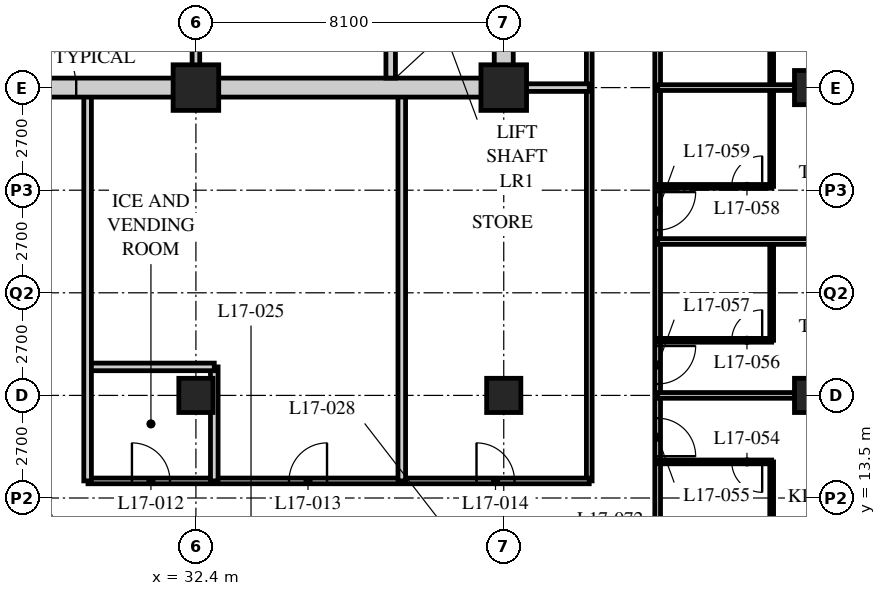
"""IFC4 building model, lengths in metres.
Left out: names, types, materials, properties, quantities, classifications, styles, units other than length and angle.
Written with IfcOpenShell. Run it as: python <this file> out.ifc"""

import sys

from ifc_helpers import new_model, si_unit, direction, frame, frame_2d, origin, origin_2d, place, context, subcontext, project, spatial, rectangle, hollow_rectangle, extrude, element, fill, save


model = new_model("IFC4")
c1 = context("Model", 3, precision=1e-05, world=origin(), true_north=direction((0.0, 1.0)))
c2 = subcontext(c1, "Body", "Model", "MODEL_VIEW")
j1 = project(units=[si_unit("LENGTHUNIT", "METRE"), si_unit("PLANEANGLEUNIT", "RADIAN")], contexts=[c1])
p1 = place(None, origin())
s1 = spatial("IfcSite", under=j1, at=p1, CompositionType="ELEMENT")
p2 = place(p1, origin())
s2 = spatial("IfcBuilding", under=s1, at=p2, CompositionType="ELEMENT")
p3 = place(p2, frame((0.0, 0.0, 70.4)))
s3 = spatial("IfcBuildingStorey", under=s2, at=p3, CompositionType="ELEMENT", Elevation=70.4)
p4 = place(p3, frame((32.4, 16.2, 0.0), z_axis=(0.0, 0.0, 1.0), x_axis=(1.0, 0.0, 0.0)))
e1 = element("IfcColumn", 1, at=p4, inside=s3, PredefinedType="COLUMN", context=c2, shape_type="SweptSolid", body=[
    extrude(hollow_rectangle(XDim=0.9, YDim=0.9, WallThickness=0.09, at=origin_2d()), origin(), (0.0, 0.0, 1.0), 3.4),
])
p5 = place(p3, frame((32.4, 24.3, 0.0), z_axis=(0.0, 0.0, 1.0), x_axis=(1.0, 0.0, 0.0)))
e2 = element("IfcColumn", 2, at=p5, inside=s3, PredefinedType="COLUMN", context=c2, shape_type="SweptSolid", body=[
    extrude(hollow_rectangle(XDim=1.2, YDim=1.2, WallThickness=0.12, at=origin_2d()), origin(), (0.0, 0.0, 1.0), 3.4),
])
p6 = place(p3, frame((40.5, 16.2, 0.0), z_axis=(0.0, 0.0, 1.0), x_axis=(1.0, 0.0, 0.0)))
e3 = element("IfcColumn", 3, at=p6, inside=s3, PredefinedType="COLUMN", context=c2, shape_type="SweptSolid", body=[
    extrude(hollow_rectangle(XDim=0.9, YDim=0.9, WallThickness=0.09, at=origin_2d()), origin(), (0.0, 0.0, 1.0), 3.4),
])
p7 = place(p3, frame((40.5, 24.3, 0.0), z_axis=(0.0, 0.0, 1.0), x_axis=(1.0, 0.0, 0.0)))
e4 = element("IfcColumn", 4, at=p7, inside=s3, PredefinedType="COLUMN", context=c2, shape_type="SweptSolid", body=[
    extrude(hollow_rectangle(XDim=1.2, YDim=1.2, WallThickness=0.12, at=origin_2d()), origin(), (0.0, 0.0, 1.0), 3.4),
])
for number, where, z_axis, x_axis in (
    (5, (48.6, 16.2, 0.0), (0.0, 0.0, 1.0), (1.0, 0.0, 0.0)),
    (6, (48.6, 24.3, 0.0), (0.0, 0.0, 1.0), (1.0, 0.0, 0.0)),
):
    element("IfcColumn", number, at=place(p3, frame(where, z_axis=z_axis, x_axis=x_axis)), inside=s3, PredefinedType="COLUMN", context=c2, shape_type="SweptSolid", body=[
        extrude(hollow_rectangle(XDim=0.9, YDim=0.9, WallThickness=0.09, at=origin_2d()), origin(), (0.0, 0.0, 1.0), 3.4),
    ])
p8 = place(p3, frame((44.55, 12.15, 0.0), z_axis=(0.0, 0.0, 1.0), x_axis=(0.0, 1.0, 0.0)))
e7 = element("IfcWall", 7, at=p8, inside=s3, PredefinedType="PARTITIONING", context=c2, shape_type="SweptSolid", body=[
    extrude(rectangle(XDim=30.15, YDim=0.15, at=frame_2d((15.075, 0.0))), origin(), (0.0, 0.0, 1.0), 3.19),
])
p9 = place(p8, frame((2.45, 0.0, 0.0)))
e8 = element("IfcOpeningElement", 8, at=p9, cuts=e7, PredefinedType="OPENING", context=c2, shape_type="SweptSolid", body=[
    extrude(rectangle(XDim=1.0, YDim=2.1, at=frame_2d((0.5, 1.05))), frame((0.0, 0.085, 0.0), z_axis=(0.0, -1.0, 0.0), x_axis=(1.0, 0.0, 0.0)), (0.0, 0.0, 1.0), 0.17),
])
p10 = place(p8, frame((4.35, 0.0, 0.0)))
e9 = element("IfcOpeningElement", 9, at=p10, cuts=e7, PredefinedType="OPENING", context=c2, shape_type="SweptSolid", body=[
    extrude(rectangle(XDim=1.0, YDim=2.1, at=frame_2d((0.5, 1.05))), frame((0.0, 0.085, 0.0), z_axis=(0.0, -1.0, 0.0), x_axis=(1.0, 0.0, 0.0)), (0.0, 0.0, 1.0), 0.17),
])
p11 = place(p8, frame((8.4, 0.0, 0.0)))
e10 = element("IfcOpeningElement", 10, at=p11, cuts=e7, PredefinedType="OPENING", context=c2, shape_type="SweptSolid", body=[
    extrude(rectangle(XDim=1.0, YDim=2.1, at=frame_2d((0.5, 1.05))), frame((0.0, 0.085, 0.0), z_axis=(0.0, -1.0, 0.0), x_axis=(1.0, 0.0, 0.0)), (0.0, 0.0, 1.0), 0.17),
])
p12 = place(p8, frame((14.6, 0.0, 0.0)))
e11 = element("IfcOpeningElement", 11, at=p12, cuts=e7, PredefinedType="OPENING", context=c2, shape_type="SweptSolid", body=[
    extrude(rectangle(XDim=1.0, YDim=2.1, at=frame_2d((0.5, 1.05))), frame((0.0, 0.085, 0.0), z_axis=(0.0, -1.0, 0.0), x_axis=(1.0, 0.0, 0.0)), (0.0, 0.0, 1.0), 0.17),
])
p13 = place(p8, frame((21.65, 0.0, 0.0)))
e12 = element("IfcOpeningElement", 12, at=p13, cuts=e7, PredefinedType="OPENING", context=c2, shape_type="SweptSolid", body=[
    extrude(rectangle(XDim=1.0, YDim=2.1, at=frame_2d((0.5, 1.05))), frame((0.0, 0.085, 0.0), z_axis=(0.0, -1.0, 0.0), x_axis=(1.0, 0.0, 0.0)), (0.0, 0.0, 1.0), 0.17),
])
p14 = place(p8, frame((26.7, 0.0, 0.0)))
e13 = element("IfcOpeningElement", 13, at=p14, cuts=e7, PredefinedType="OPENING", context=c2, shape_type="SweptSolid", body=[
    extrude(rectangle(XDim=1.0, YDim=2.1, at=frame_2d((0.5, 1.05))), frame((0.0, 0.085, 0.0), z_axis=(0.0, -1.0, 0.0), x_axis=(1.0, 0.0, 0.0)), (0.0, 0.0, 1.0), 0.17),
])
p15 = place(p3, frame((42.75, 13.95, 0.0), z_axis=(0.0, 0.0, 1.0), x_axis=(0.0, 1.0, 0.0)))
e14 = element("IfcWall", 14, at=p15, inside=s3, PredefinedType="PARTITIONING", context=c2, shape_type="SweptSolid", body=[
    extrude(rectangle(XDim=26.55, YDim=0.15, at=frame_2d((13.275, 0.0))), origin(), (0.0, 0.0, 1.0), 3.19),
])
p16 = place(p15, frame((13.9, 0.0, 0.0)))
e15 = element("IfcOpeningElement", 15, at=p16, cuts=e14, PredefinedType="OPENING", context=c2, shape_type="SweptSolid", body=[
    extrude(rectangle(XDim=1.0, YDim=2.1, at=frame_2d((0.5, 1.05))), frame((0.0, 0.085, 0.0), z_axis=(0.0, -1.0, 0.0), x_axis=(1.0, 0.0, 0.0)), (0.0, 0.0, 1.0), 0.17),
])
p17 = place(p15, frame((22.0, 0.0, 0.0)))
e16 = element("IfcOpeningElement", 16, at=p17, cuts=e14, PredefinedType="OPENING", context=c2, shape_type="SweptSolid", body=[
    extrude(rectangle(XDim=1.0, YDim=2.1, at=frame_2d((0.5, 1.05))), frame((0.0, 0.085, 0.0), z_axis=(0.0, -1.0, 0.0), x_axis=(1.0, 0.0, 0.0)), (0.0, 0.0, 1.0), 0.17),
])
p18 = place(p3, frame((29.56, 13.95, 0.0), z_axis=(0.0, 0.0, 1.0), x_axis=(1.0, 0.0, 0.0)))
e17 = element("IfcWall", 17, at=p18, inside=s3, PredefinedType="PARTITIONING", context=c2, shape_type="SweptSolid", body=[
    extrude(rectangle(XDim=13.19, YDim=0.15, at=frame_2d((6.595, 0.0))), origin(), (0.0, 0.0, 1.0), 3.19),
])
p19 = place(p18, frame((1.157, 0.0, 0.0)))
e18 = element("IfcOpeningElement", 18, at=p19, cuts=e17, PredefinedType="OPENING", context=c2, shape_type="SweptSolid", body=[
    extrude(rectangle(XDim=1.0, YDim=2.1, at=frame_2d((0.5, 1.05))), frame((0.0, 0.085, 0.0), z_axis=(0.0, -1.0, 0.0), x_axis=(1.0, 0.0, 0.0)), (0.0, 0.0, 1.0), 0.17),
])
p20 = place(p18, frame((5.29, 0.0, 0.0)))
e19 = element("IfcOpeningElement", 19, at=p20, cuts=e17, PredefinedType="OPENING", context=c2, shape_type="SweptSolid", body=[
    extrude(rectangle(XDim=1.0, YDim=2.1, at=frame_2d((0.5, 1.05))), frame((0.0, 0.085, 0.0), z_axis=(0.0, -1.0, 0.0), x_axis=(1.0, 0.0, 0.0)), (0.0, 0.0, 1.0), 0.17),
])
p21 = place(p18, frame((10.223, 0.0, 0.0)))
e20 = element("IfcOpeningElement", 20, at=p21, cuts=e17, PredefinedType="OPENING", context=c2, shape_type="SweptSolid", body=[
    extrude(rectangle(XDim=1.0, YDim=2.1, at=frame_2d((0.5, 1.05))), frame((0.0, 0.085, 0.0), z_axis=(0.0, -1.0, 0.0), x_axis=(1.0, 0.0, 0.0)), (0.0, 0.0, 1.0), 0.17),
])
p22 = place(p3, frame((32.883, 13.95, 0.0), z_axis=(0.0, 0.0, 1.0), x_axis=(0.0, 1.0, 0.0)))
e21 = element("IfcWall", 21, at=p22, inside=s3, PredefinedType="SOLIDWALL", context=c2, shape_type="SweptSolid", body=[
    extrude(rectangle(XDim=3.0, YDim=0.2, at=frame_2d((1.5, 0.0))), origin(), (0.0, 0.0, 1.0), 3.19),
])
p23 = place(p3, frame((29.55, 16.95, 0.0), z_axis=(0.0, 0.0, 1.0), x_axis=(1.0, 0.0, 0.0)))
e22 = element("IfcWall", 22, at=p23, inside=s3, PredefinedType="SOLIDWALL", context=c2, shape_type="SweptSolid", body=[
    extrude(rectangle(XDim=3.333, YDim=0.2, at=frame_2d((1.667, 0.0))), origin(), (0.0, 0.0, 1.0), 3.19),
])
for number, where, z_axis, x_axis in (
    (23, (37.817, 13.95, 0.0), (0.0, 0.0, 1.0), (0.0, 1.0, 0.0)),
    (24, (29.55, 13.95, 0.0), (0.0, 0.0, 1.0), (0.0, 1.0, 0.0)),
):
    element("IfcWall", number, at=place(p3, frame(where, z_axis=z_axis, x_axis=x_axis)), inside=s3, PredefinedType="SOLIDWALL", context=c2, shape_type="SweptSolid", body=[
        extrude(rectangle(XDim=10.35, YDim=0.2, at=frame_2d((5.175, 0.0))), origin(), (0.0, 0.0, 1.0), 3.19),
    ])
p24 = place(p3, frame((40.5, 24.3, 0.0), z_axis=(0.0, 0.0, 1.0), x_axis=(1.0, 0.0, 0.0)))
e25 = element("IfcWall", 25, at=p24, inside=s3, PredefinedType="SOLIDWALL", context=c2, shape_type="SweptSolid", body=[
    extrude(rectangle(XDim=2.25, YDim=0.2, at=frame_2d((1.125, 0.0))), origin(), (0.0, 0.0, 1.0), 2.578),
])
p25 = place(p3, frame((47.55, 12.15, 0.0), z_axis=(0.0, 0.0, 1.0), x_axis=(0.0, 1.0, 0.0)))
e26 = element("IfcWall", 26, at=p25, inside=s3, PredefinedType="PARTITIONING", context=c2, shape_type="SweptSolid", body=[
    extrude(rectangle(XDim=2.3, YDim=0.1, at=frame_2d((1.15, 0.0))), origin(), (0.0, 0.0, 1.0), 3.19),
])
p26 = place(p3, frame((44.55, 14.45, 0.0), z_axis=(0.0, 0.0, 1.0), x_axis=(1.0, 0.0, 0.0)))
e27 = element("IfcWall", 27, at=p26, inside=s3, PredefinedType="PARTITIONING", context=c2, shape_type="SweptSolid", body=[
    extrude(rectangle(XDim=3.0, YDim=0.1, at=frame_2d((1.5, 0.0))), origin(), (0.0, 0.0, 1.0), 3.19),
])
p27 = place(p26, frame((1.95, 0.0, 0.0)))
e28 = element("IfcOpeningElement", 28, at=p27, cuts=e27, PredefinedType="OPENING", context=c2, shape_type="SweptSolid", body=[
    extrude(rectangle(XDim=0.8, YDim=2.1, at=frame_2d((0.4, 1.05))), frame((0.0, 0.06, 0.0), z_axis=(0.0, -1.0, 0.0), x_axis=(1.0, 0.0, 0.0)), (0.0, 0.0, 1.0), 0.12),
])
p28 = place(p3, frame((44.55, 16.2, 0.0), z_axis=(0.0, 0.0, 1.0), x_axis=(1.0, 0.0, 0.0)))
e29 = element("IfcWall", 29, at=p28, inside=s3, PredefinedType="PARTITIONING", context=c2, shape_type="SweptSolid", body=[
    extrude(rectangle(XDim=11.85, YDim=0.15, at=frame_2d((5.925, 0.0))), origin(), (0.0, 0.0, 1.0), 2.578),
])
p29 = place(p3, frame((47.55, 17.65, 0.0), z_axis=(0.0, 0.0, 1.0), x_axis=(0.0, 1.0, 0.0)))
e30 = element("IfcWall", 30, at=p29, inside=s3, PredefinedType="PARTITIONING", context=c2, shape_type="SweptSolid", body=[
    extrude(rectangle(XDim=2.6, YDim=0.1, at=frame_2d((1.3, 0.0))), origin(), (0.0, 0.0, 1.0), 3.19),
])
p30 = place(p3, frame((44.55, 17.65, 0.0), z_axis=(0.0, 0.0, 1.0), x_axis=(1.0, 0.0, 0.0)))
e31 = element("IfcWall", 31, at=p30, inside=s3, PredefinedType="PARTITIONING", context=c2, shape_type="SweptSolid", body=[
    extrude(rectangle(XDim=3.0, YDim=0.1, at=frame_2d((1.5, 0.0))), origin(), (0.0, 0.0, 1.0), 3.19),
])
p31 = place(p30, frame((1.95, 0.0, 0.0)))
e32 = element("IfcOpeningElement", 32, at=p31, cuts=e31, PredefinedType="OPENING", context=c2, shape_type="SweptSolid", body=[
    extrude(rectangle(XDim=0.8, YDim=2.1, at=frame_2d((0.4, 1.05))), frame((0.0, 0.06, 0.0), z_axis=(0.0, -1.0, 0.0), x_axis=(1.0, 0.0, 0.0)), (0.0, 0.0, 1.0), 0.12),
])
p32 = place(p3, frame((44.55, 20.25, 0.0), z_axis=(0.0, 0.0, 1.0), x_axis=(1.0, 0.0, 0.0)))
e33 = element("IfcWall", 33, at=p32, inside=s3, PredefinedType="PARTITIONING", context=c2, shape_type="SweptSolid", body=[
    extrude(rectangle(XDim=11.85, YDim=0.15, at=frame_2d((5.925, 0.0))), origin(), (0.0, 0.0, 1.0), 3.19),
])
p33 = place(p3, frame((47.55, 21.7, 0.0), z_axis=(0.0, 0.0, 1.0), x_axis=(0.0, 1.0, 0.0)))
e34 = element("IfcWall", 34, at=p33, inside=s3, PredefinedType="PARTITIONING", context=c2, shape_type="SweptSolid", body=[
    extrude(rectangle(XDim=4.9, YDim=0.1, at=frame_2d((2.45, 0.0))), origin(), (0.0, 0.0, 1.0), 3.19),
])
p34 = place(p3, frame((44.55, 21.7, 0.0), z_axis=(0.0, 0.0, 1.0), x_axis=(1.0, 0.0, 0.0)))
e35 = element("IfcWall", 35, at=p34, inside=s3, PredefinedType="PARTITIONING", context=c2, shape_type="SweptSolid", body=[
    extrude(rectangle(XDim=3.0, YDim=0.1, at=frame_2d((1.5, 0.0))), origin(), (0.0, 0.0, 1.0), 3.19),
])
p35 = place(p34, frame((1.95, 0.0, 0.0)))
e36 = element("IfcOpeningElement", 36, at=p35, cuts=e35, PredefinedType="OPENING", context=c2, shape_type="SweptSolid", body=[
    extrude(rectangle(XDim=0.8, YDim=2.1, at=frame_2d((0.4, 1.05))), frame((0.0, 0.06, 0.0), z_axis=(0.0, -1.0, 0.0), x_axis=(1.0, 0.0, 0.0)), (0.0, 0.0, 1.0), 0.12),
])
p36 = place(p3, frame((44.55, 24.3, 0.0), z_axis=(0.0, 0.0, 1.0), x_axis=(1.0, 0.0, 0.0)))
e37 = element("IfcWall", 37, at=p36, inside=s3, PredefinedType="PARTITIONING", context=c2, shape_type="SweptSolid", body=[
    extrude(rectangle(XDim=11.85, YDim=0.15, at=frame_2d((5.925, 0.0))), origin(), (0.0, 0.0, 1.0), 2.578),
])
p37 = place(p3, frame((15.95, 24.3, 0.0), z_axis=(0.0, 0.0, 1.0), x_axis=(1.0, 0.0, 0.0)))
e38 = element("IfcWall", 38, at=p37, inside=s3, PredefinedType="SOLIDWALL", context=c2, shape_type="SweptSolid", body=[
    extrude(rectangle(XDim=24.8, YDim=0.5, at=frame_2d((12.4, 0.0))), origin(), (0.0, 0.0, 1.0), 2.54),
])
p38 = place(p37, frame((11.5, 0.0, 0.0)))
e39 = element("IfcOpeningElement", 39, at=p38, cuts=e38, PredefinedType="OPENING", context=c2, shape_type="SweptSolid", body=[
    extrude(rectangle(XDim=1.8, YDim=2.4, at=frame_2d((0.9, 1.2))), frame((0.0, 0.26, 0.0), z_axis=(0.0, -1.0, 0.0), x_axis=(1.0, 0.0, 0.0)), (0.0, 0.0, 1.0), 0.52),
])
p39 = place(p3, frame((40.5, 24.55, 0.0), z_axis=(0.0, 0.0, 1.0), x_axis=(0.0, 1.0, 0.0)))
e40 = element("IfcWall", 40, at=p39, inside=s3, PredefinedType="SOLIDWALL", context=c2, shape_type="SweptSolid", body=[
    extrude(rectangle(XDim=15.7, YDim=0.5, at=frame_2d((7.85, 0.0))), origin(), (0.0, 0.0, 1.0), 2.578),
])
p40 = place(p3, frame((37.525, 24.55, 0.0), z_axis=(0.0, 0.0, 1.0), x_axis=(0.0, 1.0, 0.0)))
e41 = element("IfcWall", 41, at=p40, inside=s3, PredefinedType="SOLIDWALL", context=c2, shape_type="SweptSolid", body=[
    extrude(rectangle(XDim=7.75, YDim=0.25, at=frame_2d((3.875, 0.0))), origin(), (0.0, 0.0, 1.0), 3.19),
])
p41 = place(p3, frame((32.4, 24.55, 0.0), z_axis=(0.0, 0.0, 1.0), x_axis=(0.0, 1.0, 0.0)))
e42 = element("IfcWall", 42, at=p41, inside=s3, PredefinedType="PARTITIONING", context=c2, shape_type="SweptSolid", body=[
    extrude(rectangle(XDim=7.75, YDim=0.2, at=frame_2d((3.875, 0.0))), origin(), (0.0, 0.0, 1.0), 2.578),
])
p42 = place(p41, frame((1.0, 0.0, 0.0)))
e43 = element("IfcOpeningElement", 43, at=p42, cuts=e42, PredefinedType="OPENING", context=c2, shape_type="SweptSolid", body=[
    extrude(rectangle(XDim=1.0, YDim=2.1, at=frame_2d((0.5, 1.05))), frame((0.0, 0.11, 0.0), z_axis=(0.0, -1.0, 0.0), x_axis=(1.0, 0.0, 0.0)), (0.0, 0.0, 1.0), 0.22),
])
p43 = place(p41, frame((3.925, 0.0, 0.0)))
e44 = element("IfcOpeningElement", 44, at=p43, cuts=e42, PredefinedType="OPENING", context=c2, shape_type="SweptSolid", body=[
    extrude(rectangle(XDim=1.0, YDim=2.1, at=frame_2d((0.5, 1.05))), frame((0.0, 0.11, 0.0), z_axis=(0.0, -1.0, 0.0), x_axis=(1.0, 0.0, 0.0)), (0.0, 0.0, 1.0), 0.22),
])
p44 = place(p41, frame((6.1, 0.0, 0.0)))
e45 = element("IfcOpeningElement", 45, at=p44, cuts=e42, PredefinedType="OPENING", context=c2, shape_type="SweptSolid", body=[
    extrude(rectangle(XDim=0.9, YDim=2.1, at=frame_2d((0.45, 1.05))), frame((0.0, 0.11, 0.0), z_axis=(0.0, -1.0, 0.0), x_axis=(1.0, 0.0, 0.0)), (0.0, 0.0, 1.0), 0.22),
])
p45 = place(p19, origin())
e46 = element("IfcDoor", 46, at=p45, inside=s3, OperationType="SINGLE_SWING_LEFT", PredefinedType="DOOR", context=c2, shape_type="SweptSolid", body=[
    extrude(rectangle(XDim=1.0, YDim=2.1, at=frame_2d((0.5, 1.05))), frame((0.0, 0.025, 0.0), z_axis=(0.0, -1.0, 0.0), x_axis=(1.0, 0.0, 0.0)), (0.0, 0.0, 1.0), 0.05),
])
fill(e18, e46)
p46 = place(p20, origin())
e47 = element("IfcDoor", 47, at=p46, inside=s3, OperationType="SINGLE_SWING_RIGHT", PredefinedType="DOOR", context=c2, shape_type="SweptSolid", body=[
    extrude(rectangle(XDim=1.0, YDim=2.1, at=frame_2d((0.5, 1.05))), frame((0.0, 0.025, 0.0), z_axis=(0.0, -1.0, 0.0), x_axis=(1.0, 0.0, 0.0)), (0.0, 0.0, 1.0), 0.05),
])
fill(e19, e47)
p47 = place(p21, origin())
e48 = element("IfcDoor", 48, at=p47, inside=s3, OperationType="SINGLE_SWING_LEFT", PredefinedType="DOOR", context=c2, shape_type="SweptSolid", body=[
    extrude(rectangle(XDim=1.0, YDim=2.1, at=frame_2d((0.5, 1.05))), frame((0.0, 0.025, 0.0), z_axis=(0.0, -1.0, 0.0), x_axis=(1.0, 0.0, 0.0)), (0.0, 0.0, 1.0), 0.05),
])
fill(e20, e48)
p48 = place(p27, origin())
e49 = element("IfcDoor", 49, at=p48, inside=s3, OperationType="SINGLE_SWING_LEFT", PredefinedType="DOOR", context=c2, shape_type="SweptSolid", body=[
    extrude(rectangle(XDim=0.8, YDim=2.1, at=frame_2d((0.4, 1.05))), frame((0.0, 0.025, 0.0), z_axis=(0.0, -1.0, 0.0), x_axis=(1.0, 0.0, 0.0)), (0.0, 0.0, 1.0), 0.05),
])
fill(e28, e49)
p49 = place(p9, origin())
e50 = element("IfcDoor", 50, at=p49, inside=s3, OperationType="SINGLE_SWING_RIGHT", PredefinedType="DOOR", context=c2, shape_type="SweptSolid", body=[
    extrude(rectangle(XDim=1.0, YDim=2.1, at=frame_2d((0.5, 1.05))), frame((0.0, 0.025, 0.0), z_axis=(0.0, -1.0, 0.0), x_axis=(1.0, 0.0, 0.0)), (0.0, 0.0, 1.0), 0.05),
])
fill(e8, e50)
p50 = place(p31, origin())
e51 = element("IfcDoor", 51, at=p50, inside=s3, OperationType="SINGLE_SWING_RIGHT", PredefinedType="DOOR", context=c2, shape_type="SweptSolid", body=[
    extrude(rectangle(XDim=0.8, YDim=2.1, at=frame_2d((0.4, 1.05))), frame((0.0, 0.025, 0.0), z_axis=(0.0, -1.0, 0.0), x_axis=(1.0, 0.0, 0.0)), (0.0, 0.0, 1.0), 0.05),
])
fill(e32, e51)
p51 = place(p10, origin())
e52 = element("IfcDoor", 52, at=p51, inside=s3, OperationType="SINGLE_SWING_LEFT", PredefinedType="DOOR", context=c2, shape_type="SweptSolid", body=[
    extrude(rectangle(XDim=1.0, YDim=2.1, at=frame_2d((0.5, 1.05))), frame((0.0, 0.025, 0.0), z_axis=(0.0, -1.0, 0.0), x_axis=(1.0, 0.0, 0.0)), (0.0, 0.0, 1.0), 0.05),
])
fill(e9, e52)
p52 = place(p35, origin())
e53 = element("IfcDoor", 53, at=p52, inside=s3, OperationType="SINGLE_SWING_RIGHT", PredefinedType="DOOR", context=c2, shape_type="SweptSolid", body=[
    extrude(rectangle(XDim=0.8, YDim=2.1, at=frame_2d((0.4, 1.05))), frame((0.0, 0.025, 0.0), z_axis=(0.0, -1.0, 0.0), x_axis=(1.0, 0.0, 0.0)), (0.0, 0.0, 1.0), 0.05),
])
fill(e36, e53)
p53 = place(p11, origin())
e54 = element("IfcDoor", 54, at=p53, inside=s3, OperationType="SINGLE_SWING_LEFT", PredefinedType="DOOR", context=c2, shape_type="SweptSolid", body=[
    extrude(rectangle(XDim=1.0, YDim=2.1, at=frame_2d((0.5, 1.05))), frame((0.0, 0.025, 0.0), z_axis=(0.0, -1.0, 0.0), x_axis=(1.0, 0.0, 0.0)), (0.0, 0.0, 1.0), 0.05),
])
fill(e10, e54)
p54 = place(p38, origin())
e55 = element("IfcDoor", 55, at=p54, inside=s3, OperationType="DOUBLE_DOOR_SINGLE_SWING", PredefinedType="DOOR", context=c2, shape_type="SweptSolid", body=[
    extrude(rectangle(XDim=1.8, YDim=2.4, at=frame_2d((0.9, 1.2))), frame((0.0, 0.025, 0.0), z_axis=(0.0, -1.0, 0.0), x_axis=(1.0, 0.0, 0.0)), (0.0, 0.0, 1.0), 0.05),
])
fill(e39, e55)
save(model, sys.argv[1])
